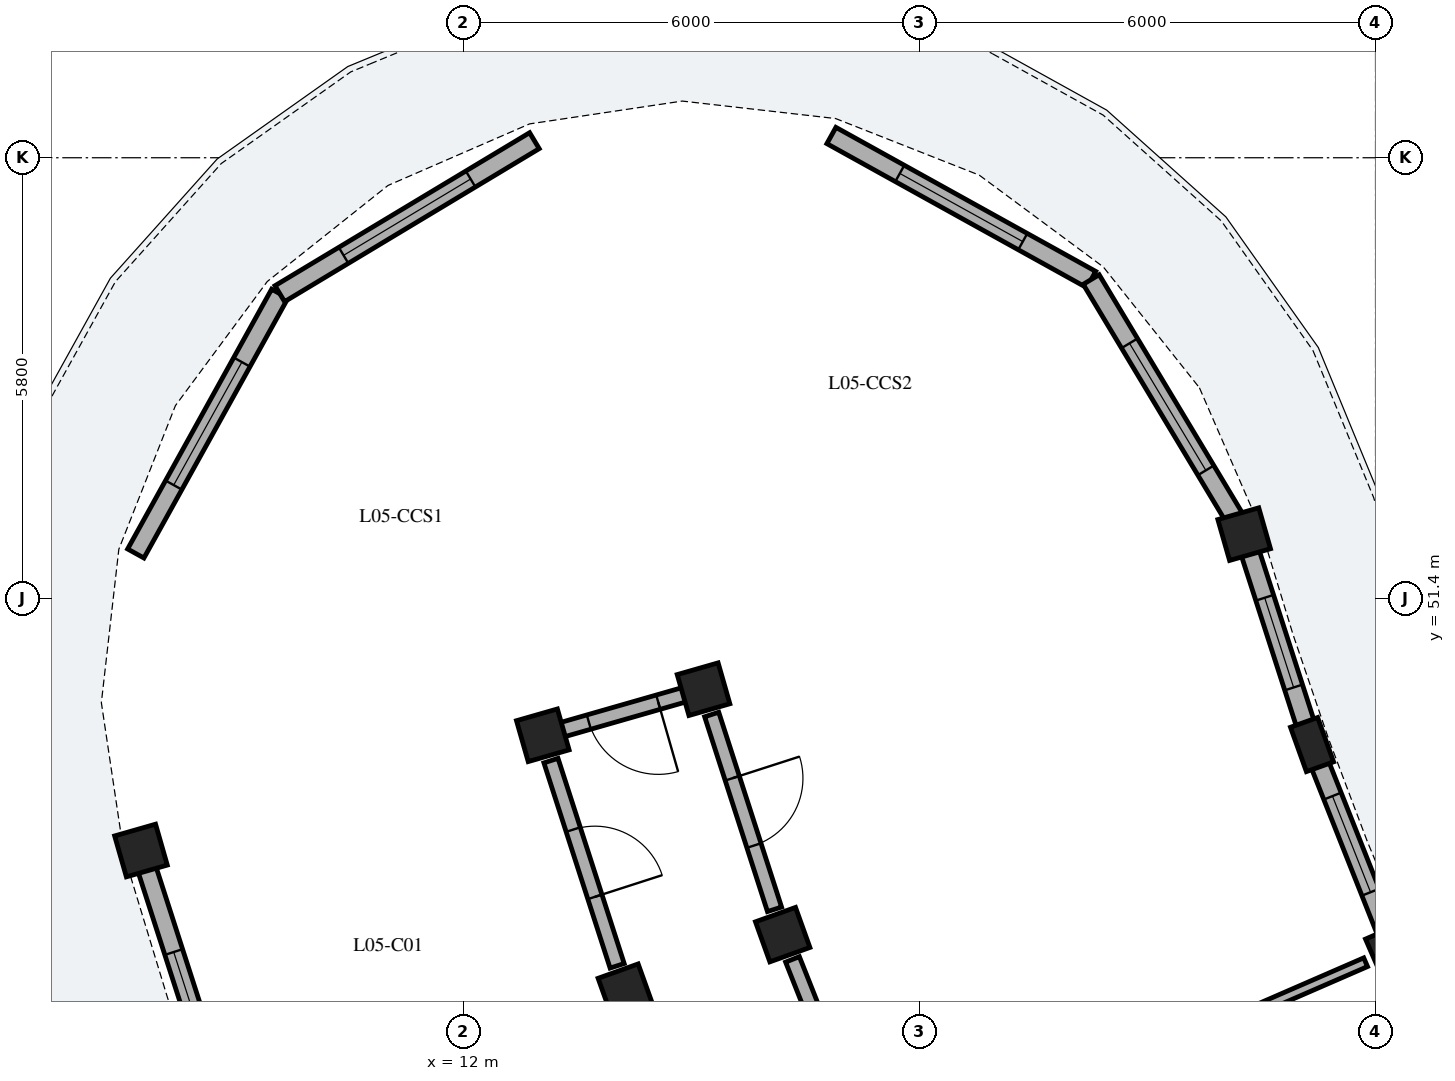
"""IFC4 building model, lengths in metres.
Left out: names, types, materials, properties, quantities, classifications, styles, units other than length and angle.
Written with IfcOpenShell. Run it as: python <this file> out.ifc"""

import sys

from ifc_helpers import new_model, si_unit, direction, frame, frame_2d, origin, origin_2d, place, context, subcontext, project, spatial, rectangle, extrude, element, fill, save


model = new_model("IFC4")
c1 = context("Model", 3, precision=1e-05, world=origin(), true_north=direction((0.0, 1.0)))
c2 = subcontext(c1, "Body", "Model", "MODEL_VIEW")
j1 = project(units=[si_unit("LENGTHUNIT", "METRE"), si_unit("PLANEANGLEUNIT", "RADIAN")], contexts=[c1])
p1 = place(None, origin())
s1 = spatial("IfcSite", under=j1, at=p1, CompositionType="ELEMENT")
p2 = place(p1, origin())
s2 = spatial("IfcBuilding", under=s1, at=p2, CompositionType="ELEMENT")
p3 = place(p2, frame((0.0, 0.0, 18.92)))
s3 = spatial("IfcBuildingStorey", under=s2, at=p3, CompositionType="ELEMENT", Elevation=18.92)
for number, where, z_axis, x_axis in (
    (1, (22.272, 52.248, 0.0), (0.0, 0.0, 1.0), (-0.961, -0.276, 0.0)),
    (2, (15.159, 50.208, 0.0), (0.0, 0.0, 1.0), (-0.961, -0.276, 0.0)),
    (3, (13.044, 49.602, 0.0), (0.0, 0.0, 1.0), (-0.961, -0.276, 0.0)),
    (4, (7.757, 48.086, 0.0), (0.0, 0.0, 1.0), (-0.961, -0.276, 0.0)),
):
    element("IfcColumn", number, at=place(p3, frame(where, z_axis=z_axis, x_axis=x_axis)), inside=s3, PredefinedType="COLUMN", context=c2, shape_type="SweptSolid", body=[
        extrude(rectangle(XDim=0.56, YDim=0.56, at=origin_2d()), origin(), (0.0, 0.0, 1.0), 3.11),
    ])
p4 = place(p3, frame((23.165, 49.479, 0.0), z_axis=(0.0, 0.0, 1.0), x_axis=(-0.941176015256, -0.337916718003, 0.0)))
e5 = element("IfcColumn", 5, at=p4, inside=s3, PredefinedType="PILASTER", context=c2, shape_type="SweptSolid", body=[
    extrude(rectangle(XDim=0.38, YDim=0.62, at=origin_2d()), origin(), (0.0, 0.0, 1.0), 3.11),
])
for number, where, z_axis, x_axis in (
    (6, (16.2, 46.979, 0.0), (0.0, 0.0, 1.0), (-0.941, -0.338, 0.0)),
    (7, (14.129, 46.236, 0.0), (0.0, 0.0, 1.0), (-0.941, -0.338, 0.0)),
    (8, (24.237, 46.776, 0.0), (0.0, 0.0, 1.0), (-0.917, -0.399, 0.0)),
):
    element("IfcColumn", number, at=place(p3, frame(where, z_axis=z_axis, x_axis=x_axis)), inside=s3, PredefinedType="COLUMN", context=c2, shape_type="SweptSolid", body=[
        extrude(rectangle(XDim=0.56, YDim=0.56, at=origin_2d()), origin(), (0.0, 0.0, 1.0), 3.11),
    ])
p5 = place(p3, frame((7.833, 47.848, 0.0), z_axis=(0.0, 0.0, 1.0), x_axis=(0.306949591136, -0.951725773793, 0.0)))
e9 = element("IfcWall", 9, at=p5, inside=s3, PredefinedType="SOLIDWALL", context=c2, shape_type="SweptSolid", body=[
    extrude(rectangle(XDim=3.487, YDim=0.245, at=frame_2d((1.743, 0.0))), origin(), (0.0, 0.0, 1.0), 2.355),
])
p6 = place(p5, frame((1.153, 0.0, 0.55)))
e10 = element("IfcOpeningElement", 10, at=p6, cuts=e9, PredefinedType="OPENING", context=c2, shape_type="SweptSolid", body=[
    extrude(rectangle(XDim=1.18, YDim=1.48, at=frame_2d((0.59, 0.74))), frame((0.0, 0.133, 0.0), z_axis=(0.0, -1.0, 0.0), x_axis=(1.0, 0.0, 0.0)), (0.0, 0.0, 1.0), 0.265),
])
p7 = place(p3, frame((22.349, 52.01, 0.0), z_axis=(0.0, 0.0, 1.0), x_axis=(0.306979942778, -0.951715984279, 0.0)))
e11 = element("IfcWall", 11, at=p7, inside=s3, PredefinedType="SOLIDWALL", context=c2, shape_type="SweptSolid", body=[
    extrude(rectangle(XDim=2.499, YDim=0.245, at=frame_2d((1.25, 0.0))), origin(), (0.0, 0.0, 1.0), 2.355),
])
p8 = place(p7, frame((0.629, 0.0, 0.55)))
e12 = element("IfcOpeningElement", 12, at=p8, cuts=e11, PredefinedType="OPENING", context=c2, shape_type="SweptSolid", body=[
    extrude(rectangle(XDim=1.24, YDim=1.535, at=frame_2d((0.62, 0.768))), frame((0.0, 0.133, 0.0), z_axis=(0.0, -1.0, 0.0), x_axis=(1.0, 0.0, 0.0)), (0.0, 0.0, 1.0), 0.265),
])
p9 = place(p3, frame((23.224, 49.331, 0.0), z_axis=(0.0, 0.0, 1.0), x_axis=(0.368558756085, -0.9296044553, 0.0)))
e13 = element("IfcWall", 13, at=p9, inside=s3, PredefinedType="SOLIDWALL", context=c2, shape_type="SweptSolid", body=[
    extrude(rectangle(XDim=2.499, YDim=0.245, at=frame_2d((1.249, 0.0))), origin(), (0.0, 0.0, 1.0), 2.355),
])
p10 = place(p9, frame((0.569, 0.0, 0.55)))
e14 = element("IfcOpeningElement", 14, at=p10, cuts=e13, PredefinedType="OPENING", context=c2, shape_type="SweptSolid", body=[
    extrude(rectangle(XDim=1.36, YDim=1.61, at=frame_2d((0.68, 0.805))), frame((0.0, 0.133, 0.0), z_axis=(0.0, -1.0, 0.0), x_axis=(1.0, 0.0, 0.0)), (0.0, 0.0, 1.0), 0.265),
])
p11 = place(p3, frame((7.689, 51.993, 0.0), z_axis=(0.0, 0.0, 1.0), x_axis=(0.48481530532, 0.874616555828, 0.0)))
e15 = element("IfcWall", 15, at=p11, inside=s3, PredefinedType="SOLIDWALL", context=c2, shape_type="SweptSolid", body=[
    extrude(rectangle(XDim=3.908, YDim=0.245, at=frame_2d((1.954, 0.0))), origin(), (0.0, 0.0, 1.0), 2.355),
])
p12 = place(p11, frame((1.029, 0.0, 0.4)))
e16 = element("IfcOpeningElement", 16, at=p12, cuts=e15, PredefinedType="OPENING", context=c2, shape_type="SweptSolid", body=[
    extrude(rectangle(XDim=1.85, YDim=1.72, at=frame_2d((0.925, 0.86))), frame((0.0, 0.133, 0.0), z_axis=(0.0, -1.0, 0.0), x_axis=(1.0, 0.0, 0.0)), (0.0, 0.0, 1.0), 0.265),
])
p13 = place(p3, frame((9.583, 55.412, 0.0), z_axis=(0.0, 0.0, 1.0), x_axis=(0.857178568309, 0.515019321998, 0.0)))
e17 = element("IfcWall", 17, at=p13, inside=s3, PredefinedType="SOLIDWALL", context=c2, shape_type="SweptSolid", body=[
    extrude(rectangle(XDim=3.908, YDim=0.245, at=frame_2d((1.954, 0.0))), origin(), (0.0, 0.0, 1.0), 2.355),
])
p14 = place(p13, frame((0.979, 0.0, 0.4)))
e18 = element("IfcOpeningElement", 18, at=p14, cuts=e17, PredefinedType="OPENING", context=c2, shape_type="SweptSolid", body=[
    extrude(rectangle(XDim=1.95, YDim=1.78, at=frame_2d((0.975, 0.89))), frame((0.0, 0.133, 0.0), z_axis=(0.0, -1.0, 0.0), x_axis=(1.0, 0.0, 0.0)), (0.0, 0.0, 1.0), 0.265),
])
p15 = place(p3, frame((16.841, 57.493, 0.0), z_axis=(0.0, 0.0, 1.0), x_axis=(0.874616555828, -0.48481530532, 0.0)))
e19 = element("IfcWall", 19, at=p15, inside=s3, PredefinedType="SOLIDWALL", context=c2, shape_type="SweptSolid", body=[
    extrude(rectangle(XDim=3.908, YDim=0.245, at=frame_2d((1.954, 0.0))), origin(), (0.0, 0.0, 1.0), 2.355),
])
p16 = place(p15, frame((1.029, 0.0, 0.4)))
e20 = element("IfcOpeningElement", 20, at=p16, cuts=e19, PredefinedType="OPENING", context=c2, shape_type="SweptSolid", body=[
    extrude(rectangle(XDim=1.85, YDim=1.72, at=frame_2d((0.925, 0.86))), frame((0.0, 0.133, 0.0), z_axis=(0.0, -1.0, 0.0), x_axis=(1.0, 0.0, 0.0)), (0.0, 0.0, 1.0), 0.265),
])
p17 = place(p3, frame((20.259, 55.598, 0.0), z_axis=(0.0, 0.0, 1.0), x_axis=(0.515037642827, -0.857167560324, 0.0)))
e21 = element("IfcWall", 21, at=p17, inside=s3, PredefinedType="SOLIDWALL", context=c2, shape_type="SweptSolid", body=[
    extrude(rectangle(XDim=3.908, YDim=0.245, at=frame_2d((1.954, 0.0))), origin(), (0.0, 0.0, 1.0), 2.355),
])
p18 = place(p17, frame((0.979, 0.0, 0.4)))
e22 = element("IfcOpeningElement", 22, at=p18, cuts=e21, PredefinedType="OPENING", context=c2, shape_type="SweptSolid", body=[
    extrude(rectangle(XDim=1.95, YDim=1.78, at=frame_2d((0.975, 0.89))), frame((0.0, 0.133, 0.0), z_axis=(0.0, -1.0, 0.0), x_axis=(1.0, 0.0, 0.0)), (0.0, 0.0, 1.0), 0.265),
])
p19 = place(p3, frame((13.151, 49.269, 0.0), z_axis=(0.0, 0.0, 1.0), x_axis=(0.30694495224, -0.951727269912, 0.0)))
e23 = element("IfcWall", 23, at=p19, inside=s3, PredefinedType="PARTITIONING", context=c2, shape_type="SweptSolid", body=[
    extrude(rectangle(XDim=2.837, YDim=0.195, at=frame_2d((1.418, 0.0))), origin(), (0.0, 0.0, 1.0), 2.37),
])
p20 = place(p19, frame((0.954, 0.0, 0.0)))
e24 = element("IfcOpeningElement", 24, at=p20, cuts=e23, PredefinedType="OPENING", context=c2, shape_type="SweptSolid", body=[
    extrude(rectangle(XDim=0.93, YDim=2.12, at=frame_2d((0.465, 1.06))), frame((0.0, 0.107, 0.0), z_axis=(0.0, -1.0, 0.0), x_axis=(1.0, 0.0, 0.0)), (0.0, 0.0, 1.0), 0.215),
])
p21 = place(p3, frame((15.266, 49.875, 0.0), z_axis=(0.0, 0.0, 1.0), x_axis=(0.306883578189, -0.951747061691, 0.0)))
e25 = element("IfcWall", 25, at=p21, inside=s3, PredefinedType="PARTITIONING", context=c2, shape_type="SweptSolid", body=[
    extrude(rectangle(XDim=2.693, YDim=0.195, at=frame_2d((1.346, 0.0))), origin(), (0.0, 0.0, 1.0), 2.37),
])
p22 = place(p21, frame((0.882, 0.0, 0.0)))
e26 = element("IfcOpeningElement", 26, at=p22, cuts=e25, PredefinedType="OPENING", context=c2, shape_type="SweptSolid", body=[
    extrude(rectangle(XDim=0.93, YDim=2.12, at=frame_2d((0.465, 1.06))), frame((0.0, 0.107, 0.0), z_axis=(0.0, -1.0, 0.0), x_axis=(1.0, 0.0, 0.0)), (0.0, 0.0, 1.0), 0.215),
])
p23 = place(p3, frame((16.329, 46.654, 0.0), z_axis=(0.0, 0.0, 1.0), x_axis=(0.368528468945, -0.929616462622, 0.0)))
e27 = element("IfcWall", 27, at=p23, inside=s3, PredefinedType="PARTITIONING", context=c2, shape_type="SweptSolid", body=[
    extrude(rectangle(XDim=2.693, YDim=0.195, at=frame_2d((1.346, 0.0))), origin(), (0.0, 0.0, 1.0), 2.37),
])
p24 = place(p23, frame((0.852, 0.0, 0.0)))
e28 = element("IfcOpeningElement", 28, at=p24, cuts=e27, PredefinedType="OPENING", context=c2, shape_type="SweptSolid", body=[
    extrude(rectangle(XDim=0.99, YDim=2.16, at=frame_2d((0.495, 1.08))), frame((0.0, 0.107, 0.0), z_axis=(0.0, -1.0, 0.0), x_axis=(1.0, 0.0, 0.0)), (0.0, 0.0, 1.0), 0.215),
])
p25 = place(p3, frame((23.87, 46.616, 0.0), z_axis=(0.0, 0.0, 1.0), x_axis=(-0.9170582943, -0.398753162817, 0.0)))
e29 = element("IfcWall", 29, at=p25, inside=s3, PredefinedType="PARTITIONING", context=c2, shape_type="SweptSolid", body=[
    extrude(rectangle(XDim=6.6, YDim=0.125, at=frame_2d((3.3, 0.0))), origin(), (0.0, 0.0, 1.0), 2.37),
])
p26 = place(p25, frame((2.855, 0.0, 0.0)))
e30 = element("IfcOpeningElement", 30, at=p26, cuts=e29, PredefinedType="OPENING", context=c2, shape_type="SweptSolid", body=[
    extrude(rectangle(XDim=0.89, YDim=2.1, at=frame_2d((0.445, 1.05))), frame((0.0, 0.073, 0.0), z_axis=(0.0, -1.0, 0.0), x_axis=(1.0, 0.0, 0.0)), (0.0, 0.0, 1.0), 0.145),
])
p27 = place(p3, frame((15.111, 50.194, 0.0), z_axis=(0.0, 0.0, 1.0), x_axis=(-0.961264701934, -0.275626872449, 0.0)))
e31 = element("IfcWall", 31, at=p27, inside=s3, PredefinedType="PARTITIONING", context=c2, shape_type="SweptSolid", body=[
    extrude(rectangle(XDim=2.1, YDim=0.195, at=frame_2d((1.05, 0.0))), origin(), (0.0, 0.0, 1.0), 2.37),
])
p28 = place(p27, frame((0.57, 0.0, 0.0)))
e32 = element("IfcOpeningElement", 32, at=p28, cuts=e31, PredefinedType="OPENING", context=c2, shape_type="SweptSolid", body=[
    extrude(rectangle(XDim=0.95, YDim=2.13, at=frame_2d((0.475, 1.065))), frame((0.0, 0.107, 0.0), z_axis=(0.0, -1.0, 0.0), x_axis=(1.0, 0.0, 0.0)), (0.0, 0.0, 1.0), 0.215),
])
p29 = place(p6, origin())
e33 = element("IfcWindow", 33, at=p29, inside=s3, PartitioningType="SINGLE_PANEL", PredefinedType="WINDOW", context=c2, shape_type="SweptSolid", body=[
    extrude(rectangle(XDim=1.18, YDim=1.48, at=frame_2d((0.59, 0.74))), frame((0.0, 0.03, 0.0), z_axis=(0.0, -1.0, 0.0), x_axis=(1.0, 0.0, 0.0)), (0.0, 0.0, 1.0), 0.06),
])
fill(e10, e33)
p30 = place(p8, origin())
e34 = element("IfcWindow", 34, at=p30, inside=s3, PartitioningType="SINGLE_PANEL", PredefinedType="WINDOW", context=c2, shape_type="SweptSolid", body=[
    extrude(rectangle(XDim=1.24, YDim=1.535, at=frame_2d((0.62, 0.768))), frame((0.0, 0.03, 0.0), z_axis=(0.0, -1.0, 0.0), x_axis=(1.0, 0.0, 0.0)), (0.0, 0.0, 1.0), 0.06),
])
fill(e12, e34)
p31 = place(p10, origin())
e35 = element("IfcWindow", 35, at=p31, inside=s3, PartitioningType="SINGLE_PANEL", PredefinedType="WINDOW", context=c2, shape_type="SweptSolid", body=[
    extrude(rectangle(XDim=1.36, YDim=1.61, at=frame_2d((0.68, 0.805))), frame((0.0, 0.03, 0.0), z_axis=(0.0, -1.0, 0.0), x_axis=(1.0, 0.0, 0.0)), (0.0, 0.0, 1.0), 0.06),
])
fill(e14, e35)
p32 = place(p12, origin())
e36 = element("IfcWindow", 36, at=p32, inside=s3, PartitioningType="SINGLE_PANEL", PredefinedType="WINDOW", context=c2, shape_type="SweptSolid", body=[
    extrude(rectangle(XDim=1.85, YDim=1.72, at=frame_2d((0.925, 0.86))), frame((0.0, 0.03, 0.0), z_axis=(0.0, -1.0, 0.0), x_axis=(1.0, 0.0, 0.0)), (0.0, 0.0, 1.0), 0.06),
])
fill(e16, e36)
p33 = place(p14, origin())
e37 = element("IfcWindow", 37, at=p33, inside=s3, PartitioningType="SINGLE_PANEL", PredefinedType="WINDOW", context=c2, shape_type="SweptSolid", body=[
    extrude(rectangle(XDim=1.95, YDim=1.78, at=frame_2d((0.975, 0.89))), frame((0.0, 0.03, 0.0), z_axis=(0.0, -1.0, 0.0), x_axis=(1.0, 0.0, 0.0)), (0.0, 0.0, 1.0), 0.06),
])
fill(e18, e37)
p34 = place(p16, origin())
e38 = element("IfcWindow", 38, at=p34, inside=s3, PartitioningType="SINGLE_PANEL", PredefinedType="WINDOW", context=c2, shape_type="SweptSolid", body=[
    extrude(rectangle(XDim=1.85, YDim=1.72, at=frame_2d((0.925, 0.86))), frame((0.0, 0.03, 0.0), z_axis=(0.0, -1.0, 0.0), x_axis=(1.0, 0.0, 0.0)), (0.0, 0.0, 1.0), 0.06),
])
fill(e20, e38)
p35 = place(p18, origin())
e39 = element("IfcWindow", 39, at=p35, inside=s3, PartitioningType="SINGLE_PANEL", PredefinedType="WINDOW", context=c2, shape_type="SweptSolid", body=[
    extrude(rectangle(XDim=1.95, YDim=1.78, at=frame_2d((0.975, 0.89))), frame((0.0, 0.03, 0.0), z_axis=(0.0, -1.0, 0.0), x_axis=(1.0, 0.0, 0.0)), (0.0, 0.0, 1.0), 0.06),
])
fill(e22, e39)
p36 = place(p20, origin())
e40 = element("IfcDoor", 40, at=p36, inside=s3, OperationType="SINGLE_SWING_RIGHT", PredefinedType="DOOR", context=c2, shape_type="SweptSolid", body=[
    extrude(rectangle(XDim=0.93, YDim=2.12, at=frame_2d((0.465, 1.06))), frame((0.0, 0.025, 0.0), z_axis=(0.0, -1.0, 0.0), x_axis=(1.0, 0.0, 0.0)), (0.0, 0.0, 1.0), 0.05),
])
fill(e24, e40)
p37 = place(p22, origin())
e41 = element("IfcDoor", 41, at=p37, inside=s3, OperationType="SINGLE_SWING_LEFT", PredefinedType="DOOR", context=c2, shape_type="SweptSolid", body=[
    extrude(rectangle(XDim=0.93, YDim=2.12, at=frame_2d((0.465, 1.06))), frame((0.0, 0.025, 0.0), z_axis=(0.0, -1.0, 0.0), x_axis=(1.0, 0.0, 0.0)), (0.0, 0.0, 1.0), 0.05),
])
fill(e26, e41)
p38 = place(p28, origin())
e42 = element("IfcDoor", 42, at=p38, inside=s3, OperationType="SINGLE_SWING_LEFT", PredefinedType="DOOR", context=c2, shape_type="SweptSolid", body=[
    extrude(rectangle(XDim=0.95, YDim=2.13, at=frame_2d((0.475, 1.065))), frame((0.0, 0.025, 0.0), z_axis=(0.0, -1.0, 0.0), x_axis=(1.0, 0.0, 0.0)), (0.0, 0.0, 1.0), 0.05),
])
fill(e32, e42)
save(model, sys.argv[1])
